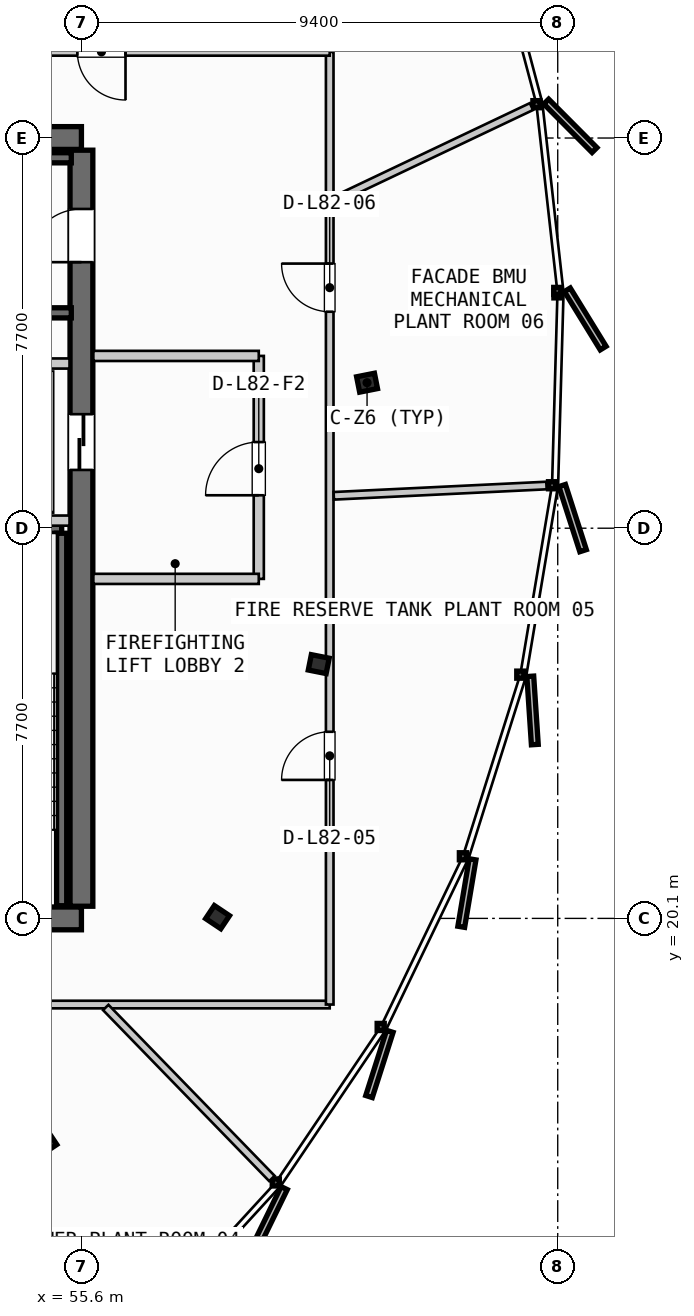
"""IFC4 building model, lengths in metres.
Left out: names, types, materials, properties, quantities, classifications, styles, units other than length and angle.
Written with IfcOpenShell. Run it as: python <this file> out.ifc"""

import sys

from ifc_helpers import new_model, si_unit, direction, frame, frame_2d, origin, origin_2d, place, context, subcontext, project, spatial, rectangle, i_section, extrude, source, transform, mapped, element, fill, save


model = new_model("IFC4")
c1 = context("Model", 3, precision=1e-05, world=origin(), true_north=direction((0.0, 1.0)))
c2 = subcontext(c1, "Body", "Model", "MODEL_VIEW")
j1 = project(units=[si_unit("LENGTHUNIT", "METRE"), si_unit("PLANEANGLEUNIT", "RADIAN")], contexts=[c1])
p1 = place(None, origin())
s1 = spatial("IfcSite", under=j1, at=p1, CompositionType="ELEMENT")
p2 = place(p1, origin())
s2 = spatial("IfcBuilding", under=s1, at=p2, CompositionType="ELEMENT")
p3 = place(p2, frame((0.0, 0.0, 308.3)))
s3 = spatial("IfcBuildingStorey", under=s2, at=p3, CompositionType="ELEMENT", Elevation=308.3)
p4 = place(p3, frame((38.0, 20.1, 0.0), z_axis=(0.0, 0.0, 1.0), x_axis=(1.0, 0.0, 0.0)))
e1 = element("IfcWall", 1, at=p4, inside=s3, PredefinedType="SHEAR", context=c2, shape_type="SweptSolid", body=[
    extrude(rectangle(XDim=17.6, YDim=0.45, at=frame_2d((8.8, 0.0))), origin(), (0.0, 0.0, 1.0), 3.735),
])
p5 = place(p4, frame((1.4, 0.0, 0.0)))
e2 = element("IfcOpeningElement", 2, at=p5, cuts=e1, PredefinedType="OPENING", context=c2, shape_type="SweptSolid", body=[
    extrude(rectangle(XDim=1.05, YDim=2.15, at=frame_2d((0.525, 1.075))), frame((0.0, 0.235, 0.0), z_axis=(0.0, -1.0, 0.0), x_axis=(1.0, 0.0, 0.0)), (0.0, 0.0, 1.0), 0.47),
])
p6 = place(p4, frame((15.15, 0.0, 0.0)))
e3 = element("IfcOpeningElement", 3, at=p6, cuts=e1, PredefinedType="OPENING", context=c2, shape_type="SweptSolid", body=[
    extrude(rectangle(XDim=1.05, YDim=2.15, at=frame_2d((0.525, 1.075))), frame((0.0, 0.235, 0.0), z_axis=(0.0, -1.0, 0.0), x_axis=(1.0, 0.0, 0.0)), (0.0, 0.0, 1.0), 0.47),
])
p7 = place(p4, frame((5.25, 0.0, 0.0)))
e4 = element("IfcOpeningElement", 4, at=p7, cuts=e1, PredefinedType="OPENING", context=c2, shape_type="SweptSolid", body=[
    extrude(rectangle(XDim=0.95, YDim=2.15, at=frame_2d((0.475, 1.075))), frame((0.0, 0.235, 0.0), z_axis=(0.0, -1.0, 0.0), x_axis=(1.0, 0.0, 0.0)), (0.0, 0.0, 1.0), 0.47),
])
p8 = place(p4, frame((11.4, 0.0, 0.0)))
e5 = element("IfcOpeningElement", 5, at=p8, cuts=e1, PredefinedType="OPENING", context=c2, shape_type="SweptSolid", body=[
    extrude(rectangle(XDim=0.95, YDim=2.15, at=frame_2d((0.475, 1.075))), frame((0.0, 0.235, 0.0), z_axis=(0.0, -1.0, 0.0), x_axis=(1.0, 0.0, 0.0)), (0.0, 0.0, 1.0), 0.47),
])
p9 = place(p3, frame((55.6, 35.5, 0.0), z_axis=(0.0, 0.0, 1.0), x_axis=(-1.0, 0.0, 0.0)))
e6 = element("IfcWall", 6, at=p9, inside=s3, PredefinedType="SHEAR", context=c2, shape_type="SweptSolid", body=[
    extrude(rectangle(XDim=17.6, YDim=0.45, at=frame_2d((8.8, 0.0))), origin(), (0.0, 0.0, 1.0), 3.735),
])
p10 = place(p9, frame((8.05, 0.0, 0.0)))
e7 = element("IfcOpeningElement", 7, at=p10, cuts=e6, PredefinedType="OPENING", context=c2, shape_type="SweptSolid", body=[
    extrude(rectangle(XDim=1.5, YDim=2.2, at=frame_2d((0.75, 1.1))), frame((0.0, 0.235, 0.0), z_axis=(0.0, -1.0, 0.0), x_axis=(1.0, 0.0, 0.0)), (0.0, 0.0, 1.0), 0.47),
])
p11 = place(p9, frame((15.1, 0.0, 0.0)))
e8 = element("IfcOpeningElement", 8, at=p11, cuts=e6, PredefinedType="OPENING", context=c2, shape_type="SweptSolid", body=[
    extrude(rectangle(XDim=0.95, YDim=2.15, at=frame_2d((0.475, 1.075))), frame((0.0, 0.235, 0.0), z_axis=(0.0, -1.0, 0.0), x_axis=(1.0, 0.0, 0.0)), (0.0, 0.0, 1.0), 0.47),
])
p12 = place(p9, frame((12.6, 0.0, 0.0)))
e9 = element("IfcOpeningElement", 9, at=p12, cuts=e6, PredefinedType="OPENING", context=c2, shape_type="SweptSolid", body=[
    extrude(rectangle(XDim=0.95, YDim=2.15, at=frame_2d((0.475, 1.075))), frame((0.0, 0.235, 0.0), z_axis=(0.0, -1.0, 0.0), x_axis=(1.0, 0.0, 0.0)), (0.0, 0.0, 1.0), 0.47),
])
p13 = place(p9, frame((10.45, 0.0, 0.0)))
e10 = element("IfcOpeningElement", 10, at=p13, cuts=e6, PredefinedType="OPENING", context=c2, shape_type="SweptSolid", body=[
    extrude(rectangle(XDim=0.95, YDim=2.15, at=frame_2d((0.475, 1.075))), frame((0.0, 0.235, 0.0), z_axis=(0.0, -1.0, 0.0), x_axis=(1.0, 0.0, 0.0)), (0.0, 0.0, 1.0), 0.47),
])
p14 = place(p3, frame((55.6, 20.34, 0.0), z_axis=(0.0, 0.0, 1.0), x_axis=(0.0, 1.0, 0.0)))
e11 = element("IfcWall", 11, at=p14, inside=s3, PredefinedType="SHEAR", context=c2, shape_type="SweptSolid", body=[
    extrude(rectangle(XDim=14.92, YDim=0.45, at=frame_2d((7.46, 0.0))), origin(), (0.0, 0.0, 1.0), 3.735),
])
p15 = place(p14, frame((12.71, 0.0, 0.0)))
e12 = element("IfcOpeningElement", 12, at=p15, cuts=e11, PredefinedType="OPENING", context=c2, shape_type="SweptSolid", body=[
    extrude(rectangle(XDim=1.05, YDim=2.15, at=frame_2d((0.525, 1.075))), frame((0.0, 0.235, 0.0), z_axis=(0.0, -1.0, 0.0), x_axis=(1.0, 0.0, 0.0)), (0.0, 0.0, 1.0), 0.47),
])
p16 = place(p14, frame((8.61, 0.0, 0.0)))
e13 = element("IfcOpeningElement", 13, at=p16, cuts=e11, PredefinedType="OPENING", context=c2, shape_type="SweptSolid", body=[
    extrude(rectangle(XDim=1.1, YDim=2.2, at=frame_2d((0.55, 1.1))), frame((0.0, 0.235, 0.0), z_axis=(0.0, -1.0, 0.0), x_axis=(1.0, 0.0, 0.0)), (0.0, 0.0, 1.0), 0.47),
])
m1 = source(origin(), c2, "Body", "SweptSolid", [
    extrude(i_section(OverallWidth=0.309, OverallDepth=0.359, WebThickness=0.016, FlangeThickness=0.026, FilletRadius=0.027, at=origin_2d()), origin(), (0.0, 0.0, 1.0), 3.735),
])
for number, where, z_axis, x_axis in (
    (14, (61.237, 30.672, 0.0), (0.0, 0.0, 1.0), (0.981, 0.195, 0.0)),
    (15, (54.885, 15.7, 0.0), (0.0, 0.0, 1.0), (0.556, -0.831, 0.0)),
    (16, (58.287, 20.125, 0.0), (0.0, 0.0, 1.0), (0.831, -0.556, 0.0)),
    (17, (60.284, 25.118, 0.0), (0.0, 0.0, 1.0), (0.981, -0.195, 0.0)),
):
    element("IfcColumn", number, at=place(p3, frame(where, z_axis=z_axis, x_axis=x_axis)), inside=s3, PredefinedType="COLUMN", context=c2, shape_type="MappedRepresentation", body=[
        mapped(m1, transform((0.0, 0.0, 0.0), scale=1.0)),
    ])
p17 = place(p3, frame((52.15, 27.8, 0.0), z_axis=(0.0, 0.0, 1.0), x_axis=(1.0, 0.0, 0.0)))
e18 = element("IfcWall", 18, at=p17, inside=s3, PredefinedType="SHEAR", context=c2, shape_type="SweptSolid", body=[
    extrude(rectangle(XDim=3.06, YDim=0.2, at=frame_2d((1.53, 0.0))), origin(), (0.0, 0.0, 1.0), 3.735),
])
for number, where, z_axis, x_axis in (
    (19, (55.21, 27.7, 0.0), (0.0, 0.0, 1.0), (0.0, -1.0, 0.0)),
    (20, (48.05, 35.11, 0.0), (0.0, 0.0, 1.0), (1.0, 0.0, 0.0)),
    (21, (55.4, 32.05, 0.0), (0.0, 0.0, 1.0), (-1.0, 0.0, 0.0)),
):
    element("IfcWall", number, at=place(p3, frame(where, z_axis=z_axis, x_axis=x_axis)), inside=s3, PredefinedType="SHEAR", context=c2, shape_type="SweptSolid", body=[
        extrude(rectangle(XDim=7.35, YDim=0.2, at=frame_2d((3.675, 0.0))), origin(), (0.0, 0.0, 1.0), 3.735),
    ])
for number, where, z_axis, x_axis in (
    (22, (52.45, 27.95, 0.0), (0.0, 0.0, 1.0), (1.0, 0.0, 0.0)),
    (23, (52.45, 31.05, 0.0), (0.0, 0.0, 1.0), (1.0, 0.0, 0.0)),
):
    element("IfcWall", number, at=place(p3, frame(where, z_axis=z_axis, x_axis=x_axis)), inside=s3, PredefinedType="PARTITIONING", context=c2, shape_type="SweptSolid", body=[
        extrude(rectangle(XDim=2.915, YDim=0.2, at=frame_2d((1.458, 0.0))), origin(), (0.0, 0.0, 1.0), 3.26),
    ])
p18 = place(p3, frame((59.1, 26.8, 0.0), z_axis=(0.0, 0.0, 1.0), x_axis=(0.0, 1.0, 0.0)))
e24 = element("IfcWall", 24, at=p18, inside=s3, PredefinedType="PARTITIONING", context=c2, shape_type="SweptSolid", body=[
    extrude(rectangle(XDim=4.4, YDim=0.2, at=frame_2d((2.2, 0.0))), origin(), (0.0, 0.0, 1.0), 3.26),
])
p19 = place(p18, frame((1.65, 0.0, 0.0)))
e25 = element("IfcOpeningElement", 25, at=p19, cuts=e24, PredefinedType="OPENING", context=c2, shape_type="SweptSolid", body=[
    extrude(rectangle(XDim=1.05, YDim=2.15, at=frame_2d((0.525, 1.075))), frame((0.0, 0.11, 0.0), z_axis=(0.0, -1.0, 0.0), x_axis=(1.0, 0.0, 0.0)), (0.0, 0.0, 1.0), 0.22),
])
for number, where, z_axis, x_axis in (
    (26, (55.835, 26.8, 0.0), (0.0, 0.0, 1.0), (1.0, 0.0, 0.0)),
    (27, (55.835, 31.2, 0.0), (0.0, 0.0, 1.0), (1.0, 0.0, 0.0)),
):
    element("IfcWall", number, at=place(p3, frame(where, z_axis=z_axis, x_axis=x_axis)), inside=s3, PredefinedType="PARTITIONING", context=c2, shape_type="SweptSolid", body=[
        extrude(rectangle(XDim=3.265, YDim=0.2, at=frame_2d((1.633, 0.0))), origin(), (0.0, 0.0, 1.0), 3.26),
    ])
p20 = place(p3, frame((33.1, 18.4, 0.0), z_axis=(0.0, 0.0, 1.0), x_axis=(1.0, 0.0, 0.0)))
e28 = element("IfcWall", 28, at=p20, inside=s3, PredefinedType="PARTITIONING", context=c2, shape_type="SweptSolid", body=[
    extrude(rectangle(XDim=27.4, YDim=0.15, at=frame_2d((13.7, 0.0))), origin(), (0.0, 0.0, 1.0), 3.26),
])
p21 = place(p20, frame((5.438, 0.0, 0.0)))
e29 = element("IfcOpeningElement", 29, at=p21, cuts=e28, PredefinedType="OPENING", context=c2, shape_type="SweptSolid", body=[
    extrude(rectangle(XDim=0.95, YDim=2.15, at=frame_2d((0.475, 1.075))), frame((0.0, 0.085, 0.0), z_axis=(0.0, -1.0, 0.0), x_axis=(1.0, 0.0, 0.0)), (0.0, 0.0, 1.0), 0.17),
])
p22 = place(p20, frame((12.49, 0.0, 0.0)))
e30 = element("IfcOpeningElement", 30, at=p22, cuts=e28, PredefinedType="OPENING", context=c2, shape_type="SweptSolid", body=[
    extrude(rectangle(XDim=0.95, YDim=2.15, at=frame_2d((0.475, 1.075))), frame((0.0, 0.085, 0.0), z_axis=(0.0, -1.0, 0.0), x_axis=(1.0, 0.0, 0.0)), (0.0, 0.0, 1.0), 0.17),
])
p23 = place(p20, frame((19.863, 0.0, 0.0)))
e31 = element("IfcOpeningElement", 31, at=p23, cuts=e28, PredefinedType="OPENING", context=c2, shape_type="SweptSolid", body=[
    extrude(rectangle(XDim=0.95, YDim=2.15, at=frame_2d((0.475, 1.075))), frame((0.0, 0.085, 0.0), z_axis=(0.0, -1.0, 0.0), x_axis=(1.0, 0.0, 0.0)), (0.0, 0.0, 1.0), 0.17),
])
p24 = place(p3, frame((60.5, 18.4, 0.0), z_axis=(0.0, 0.0, 1.0), x_axis=(0.0, 1.0, 0.0)))
e32 = element("IfcWall", 32, at=p24, inside=s3, PredefinedType="PARTITIONING", context=c2, shape_type="SweptSolid", body=[
    extrude(rectangle(XDim=18.8, YDim=0.15, at=frame_2d((9.4, 0.0))), origin(), (0.0, 0.0, 1.0), 3.26),
])
p25 = place(p24, frame((4.433, 0.0, 0.0)))
e33 = element("IfcOpeningElement", 33, at=p25, cuts=e32, PredefinedType="OPENING", context=c2, shape_type="SweptSolid", body=[
    extrude(rectangle(XDim=0.95, YDim=2.15, at=frame_2d((0.475, 1.075))), frame((0.0, 0.085, 0.0), z_axis=(0.0, -1.0, 0.0), x_axis=(1.0, 0.0, 0.0)), (0.0, 0.0, 1.0), 0.17),
])
p26 = place(p24, frame((13.672, 0.0, 0.0)))
e34 = element("IfcOpeningElement", 34, at=p26, cuts=e32, PredefinedType="OPENING", context=c2, shape_type="SweptSolid", body=[
    extrude(rectangle(XDim=0.95, YDim=2.15, at=frame_2d((0.475, 1.075))), frame((0.0, 0.085, 0.0), z_axis=(0.0, -1.0, 0.0), x_axis=(1.0, 0.0, 0.0)), (0.0, 0.0, 1.0), 0.17),
])
p27 = place(p3, frame((60.5, 37.2, 0.0), z_axis=(0.0, 0.0, 1.0), x_axis=(-1.0, 0.0, 0.0)))
e35 = element("IfcWall", 35, at=p27, inside=s3, PredefinedType="PARTITIONING", context=c2, shape_type="SweptSolid", body=[
    extrude(rectangle(XDim=27.4, YDim=0.15, at=frame_2d((13.7, 0.0))), origin(), (0.0, 0.0, 1.0), 3.26),
])
p28 = place(p27, frame((4.03, 0.0, 0.0)))
e36 = element("IfcOpeningElement", 36, at=p28, cuts=e35, PredefinedType="OPENING", context=c2, shape_type="SweptSolid", body=[
    extrude(rectangle(XDim=0.95, YDim=2.15, at=frame_2d((0.475, 1.075))), frame((0.0, 0.085, 0.0), z_axis=(0.0, -1.0, 0.0), x_axis=(1.0, 0.0, 0.0)), (0.0, 0.0, 1.0), 0.17),
])
p29 = place(p27, frame((12.447, 0.0, 0.0)))
e37 = element("IfcOpeningElement", 37, at=p29, cuts=e35, PredefinedType="OPENING", context=c2, shape_type="SweptSolid", body=[
    extrude(rectangle(XDim=0.95, YDim=2.15, at=frame_2d((0.475, 1.075))), frame((0.0, 0.085, 0.0), z_axis=(0.0, -1.0, 0.0), x_axis=(1.0, 0.0, 0.0)), (0.0, 0.0, 1.0), 0.17),
])
p30 = place(p27, frame((19.708, 0.0, 0.0)))
e38 = element("IfcOpeningElement", 38, at=p30, cuts=e35, PredefinedType="OPENING", context=c2, shape_type="SweptSolid", body=[
    extrude(rectangle(XDim=0.95, YDim=2.15, at=frame_2d((0.475, 1.075))), frame((0.0, 0.085, 0.0), z_axis=(0.0, -1.0, 0.0), x_axis=(1.0, 0.0, 0.0)), (0.0, 0.0, 1.0), 0.17),
])
p31 = place(p3, frame((56.08, 18.343, 0.0), z_axis=(0.0, 0.0, 1.0), x_axis=(0.69689016939, -0.717177866228, 0.0)))
e39 = element("IfcWall", 39, at=p31, inside=s3, PredefinedType="PARTITIONING", context=c2, shape_type="SweptSolid", body=[
    extrude(rectangle(XDim=4.705, YDim=0.15, at=frame_2d((2.353, 0.0))), origin(), (0.0, 0.0, 1.0), 3.26),
])
p32 = place(p3, frame((60.58, 28.439, 0.0), z_axis=(0.0, 0.0, 1.0), x_axis=(0.998828771517, 0.048384761961, 0.0)))
e40 = element("IfcWall", 40, at=p32, inside=s3, PredefinedType="PARTITIONING", context=c2, shape_type="SweptSolid", body=[
    extrude(rectangle(XDim=4.203, YDim=0.15, at=frame_2d((2.102, 0.0))), origin(), (0.0, 0.0, 1.0), 3.26),
])
p33 = place(p3, frame((60.572, 34.264, 0.0), z_axis=(0.0, 0.0, 1.0), x_axis=(0.903261650303, 0.429090189928, 0.0)))
e41 = element("IfcWall", 41, at=p33, inside=s3, PredefinedType="PARTITIONING", context=c2, shape_type="SweptSolid", body=[
    extrude(rectangle(XDim=4.327, YDim=0.15, at=frame_2d((2.164, 0.0))), origin(), (0.0, 0.0, 1.0), 3.26),
])
m2 = source(origin(), c2, "Body", "SweptSolid", [
    extrude(rectangle(XDim=1.05, YDim=2.15, at=frame_2d((0.525, 1.075))), frame((0.0, 0.025, 0.0), z_axis=(0.0, -1.0, 0.0), x_axis=(1.0, 0.0, 0.0)), (0.0, 0.0, 1.0), 0.05),
])
p34 = place(p15, origin())
e42 = element("IfcDoor", 42, at=p34, inside=s3, OperationType="SINGLE_SWING_LEFT", PredefinedType="DOOR", context=c2, shape_type="MappedRepresentation", body=[
    mapped(m2, transform((0.0, 0.0, 0.0), scale=1.0)),
])
fill(e12, e42)
m3 = source(origin(), c2, "Body", "SweptSolid", [
    extrude(rectangle(XDim=1.1, YDim=2.2, at=frame_2d((0.55, 1.1))), frame((0.0, 0.025, 0.0), z_axis=(0.0, -1.0, 0.0), x_axis=(1.0, 0.0, 0.0)), (0.0, 0.0, 1.0), 0.05),
])
p35 = place(p16, origin())
e43 = element("IfcDoor", 43, at=p35, inside=s3, OperationType="SLIDING_TO_RIGHT", PredefinedType="DOOR", context=c2, shape_type="MappedRepresentation", body=[
    mapped(m3, transform((0.0, 0.0, 0.0), scale=1.0)),
])
fill(e13, e43)
p36 = place(p19, origin())
e44 = element("IfcDoor", 44, at=p36, inside=s3, OperationType="SINGLE_SWING_LEFT", PredefinedType="DOOR", context=c2, shape_type="MappedRepresentation", body=[
    mapped(m2, transform((0.0, 0.0, 0.0), scale=1.0)),
])
fill(e25, e44)
m4 = source(origin(), c2, "Body", "SweptSolid", [
    extrude(rectangle(XDim=0.95, YDim=2.15, at=frame_2d((0.475, 1.075))), frame((0.0, 0.025, 0.0), z_axis=(0.0, -1.0, 0.0), x_axis=(1.0, 0.0, 0.0)), (0.0, 0.0, 1.0), 0.05),
])
p37 = place(p25, origin())
e45 = element("IfcDoor", 45, at=p37, inside=s3, OperationType="SINGLE_SWING_LEFT", PredefinedType="DOOR", context=c2, shape_type="MappedRepresentation", body=[
    mapped(m4, transform((0.0, 0.0, 0.0), scale=1.0)),
])
fill(e33, e45)
p38 = place(p26, origin())
e46 = element("IfcDoor", 46, at=p38, inside=s3, OperationType="SINGLE_SWING_RIGHT", PredefinedType="DOOR", context=c2, shape_type="MappedRepresentation", body=[
    mapped(m4, transform((0.0, 0.0, 0.0), scale=1.0)),
])
fill(e34, e46)
p39 = place(p28, origin())
e47 = element("IfcDoor", 47, at=p39, inside=s3, OperationType="SINGLE_SWING_LEFT", PredefinedType="DOOR", context=c2, shape_type="MappedRepresentation", body=[
    mapped(m4, transform((0.0, 0.0, 0.0), scale=1.0)),
])
fill(e36, e47)
save(model, sys.argv[1])
